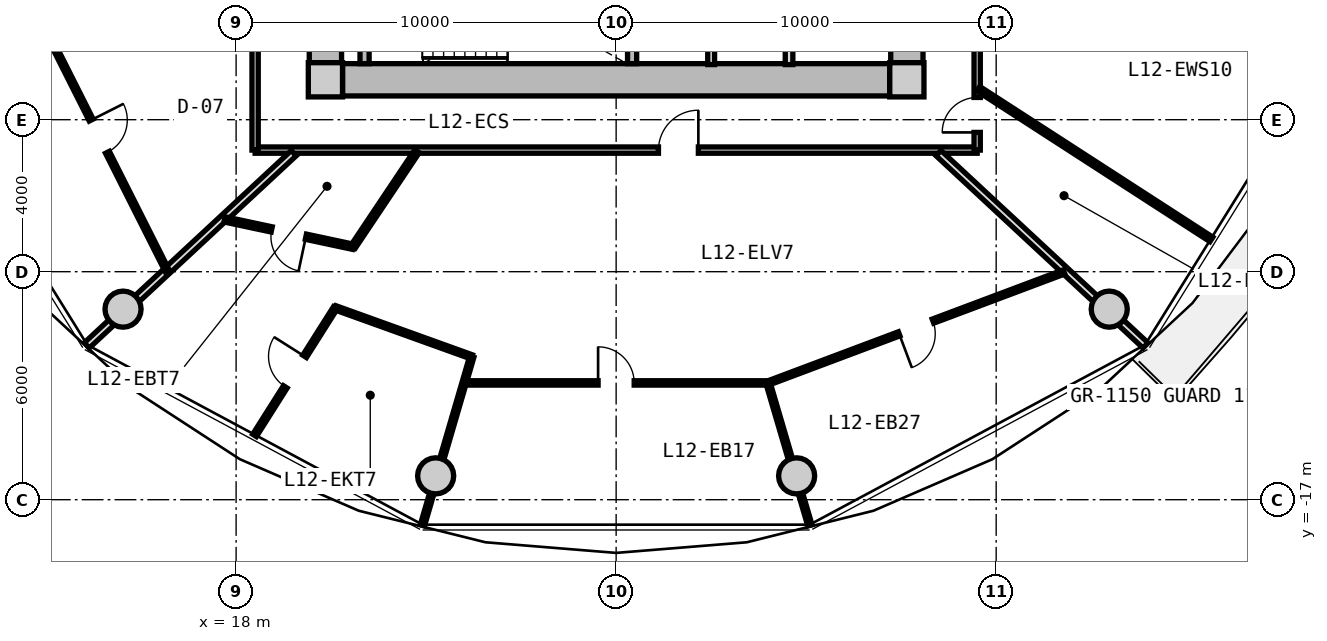
"""IFC4 building model, lengths in metres.
Left out: names, types, materials, properties, quantities, classifications, styles, units other than length and angle.
Written with IfcOpenShell. Run it as: python <this file> out.ifc"""

import sys

from ifc_helpers import new_model, si_unit, direction, frame, frame_2d, origin, origin_2d, place, context, subcontext, project, spatial, rectangle, circle, extrude, source, transform, mapped, element, fill, save


model = new_model("IFC4")
c1 = context("Model", 3, precision=1e-05, world=origin(), true_north=direction((0.0, 1.0)))
c2 = subcontext(c1, "Body", "Model", "MODEL_VIEW")
j1 = project(units=[si_unit("LENGTHUNIT", "METRE"), si_unit("PLANEANGLEUNIT", "RADIAN")], contexts=[c1])
p1 = place(None, origin())
s1 = spatial("IfcSite", under=j1, at=p1, CompositionType="ELEMENT")
p2 = place(p1, origin())
s2 = spatial("IfcBuilding", under=s1, at=p2, CompositionType="ELEMENT")
p3 = place(p2, frame((0.0, 0.0, 42.95)))
s3 = spatial("IfcBuildingStorey", under=s2, at=p3, CompositionType="ELEMENT", Elevation=42.95)
m1 = source(origin(), c2, "Body", "SweptSolid", [
    extrude(rectangle(XDim=0.9, YDim=0.9, at=origin_2d()), origin(), (0.0, 0.0, 1.0), 3.05),
])
for number, where, z_axis, x_axis in (
    (1, (20.35, -5.95, 0.0), (0.0, 0.0, 1.0), (1.0, 0.0, 0.0)),
    (2, (35.65, -5.95, 0.0), (0.0, 0.0, 1.0), (1.0, 0.0, 0.0)),
):
    element("IfcColumn", number, at=place(p3, frame(where, z_axis=z_axis, x_axis=x_axis)), inside=s3, PredefinedType="COLUMN", context=c2, shape_type="MappedRepresentation", body=[
        mapped(m1, transform((0.0, 0.0, 0.0), x_axis=(1.0, 0.0, 0.0), y_axis=(0.0, 1.0, 0.0), z_axis=(0.0, 0.0, 1.0), scale=1.0)),
    ])
m2 = source(origin(), c2, "Body", "SweptSolid", [
    extrude(rectangle(XDim=14.4, YDim=0.85, at=frame_2d((7.2, 0.0))), origin(), (0.0, 0.0, 1.0), 2.79),
])
p4 = place(p3, frame((35.2, -5.95, 0.0), z_axis=(0.0, 0.0, 1.0), x_axis=(-1.0, 0.0, 0.0)))
e3 = element("IfcWall", 3, at=p4, inside=s3, PredefinedType="SHEAR", context=c2, shape_type="MappedRepresentation", body=[
    mapped(m2, transform((0.0, 0.0, 0.0), x_axis=(1.0, 0.0, 0.0), y_axis=(0.0, 1.0, 0.0), z_axis=(0.0, 0.0, 1.0), scale=1.0)),
])
m3 = source(origin(), c2, "Body", "SweptSolid", [
    extrude(rectangle(XDim=11.0, YDim=0.85, at=frame_2d((5.5, 0.0))), origin(), (0.0, 0.0, 1.0), 2.79),
])
p5 = place(p3, frame((20.35, -5.5, 0.0), z_axis=(0.0, 0.0, 1.0), x_axis=(0.0, 1.0, 0.0)))
e4 = element("IfcWall", 4, at=p5, inside=s3, PredefinedType="SHEAR", context=c2, shape_type="MappedRepresentation", body=[
    mapped(m3, transform((0.0, 0.0, 0.0), x_axis=(1.0, 0.0, 0.0), y_axis=(0.0, 1.0, 0.0), z_axis=(0.0, 0.0, 1.0), scale=1.0)),
])
p6 = place(p5, frame((3.8, 0.0, 0.0)))
e5 = element("IfcOpeningElement", 5, at=p6, cuts=e4, PredefinedType="OPENING", context=c2, shape_type="SweptSolid", body=[
    extrude(rectangle(XDim=1.2, YDim=2.15, at=frame_2d((0.6, 1.075))), frame((0.0, 0.435, 0.0), z_axis=(0.0, -1.0, 0.0), x_axis=(1.0, 0.0, 0.0)), (0.0, 0.0, 1.0), 0.87),
])
p7 = place(p3, frame((35.65, 5.5, 0.0), z_axis=(0.0, 0.0, 1.0), x_axis=(0.0, -1.0, 0.0)))
e6 = element("IfcWall", 6, at=p7, inside=s3, PredefinedType="SHEAR", context=c2, shape_type="MappedRepresentation", body=[
    mapped(m3, transform((0.0, 0.0, 0.0), x_axis=(1.0, 0.0, 0.0), y_axis=(0.0, 1.0, 0.0), z_axis=(0.0, 0.0, 1.0), scale=1.0)),
])
p8 = place(p7, frame((5.65, 0.0, 0.0)))
e7 = element("IfcOpeningElement", 7, at=p8, cuts=e6, PredefinedType="OPENING", context=c2, shape_type="SweptSolid", body=[
    extrude(rectangle(XDim=1.2, YDim=2.15, at=frame_2d((0.6, 1.075))), frame((0.0, 0.435, 0.0), z_axis=(0.0, -1.0, 0.0), x_axis=(1.0, 0.0, 0.0)), (0.0, 0.0, 1.0), 0.87),
])
m4 = source(origin(), c2, "Body", "SweptSolid", [
    extrude(circle(Radius=0.475, at=origin_2d()), origin(), (0.0, 0.0, 1.0), 3.05),
])
for number, where, z_axis, x_axis in (
    (8, (15.025, -11.985, 0.0), (0.0, 0.0, 1.0), (1.0, 0.0, 0.0)),
    (9, (23.251, -16.373, 0.0), (0.0, 0.0, 1.0), (1.0, 0.0, 0.0)),
    (10, (32.749, -16.373, 0.0), (0.0, 0.0, 1.0), (1.0, 0.0, 0.0)),
    (11, (40.975, -11.985, 0.0), (0.0, 0.0, 1.0), (1.0, 0.0, 0.0)),
):
    element("IfcColumn", number, at=place(p3, frame(where, z_axis=z_axis, x_axis=x_axis)), inside=s3, PredefinedType="COLUMN", context=c2, shape_type="MappedRepresentation", body=[
        mapped(m4, transform((0.0, 0.0, 0.0), x_axis=(1.0, 0.0, 0.0), y_axis=(0.0, 1.0, 0.0), z_axis=(0.0, 0.0, 1.0), scale=1.0)),
    ])
m5 = source(origin(), c2, "Body", "SweptSolid", [
    extrude(rectangle(XDim=3.075, YDim=0.24, at=frame_2d((1.538, 0.0))), origin(), (0.0, 0.0, 1.0), 2.79),
])
for number, where, z_axis, x_axis in (
    (12, (21.38, -5.525, 0.0), (0.0, 0.0, 1.0), (0.0, 1.0, 0.0)),
    (13, (28.42, -5.525, 0.0), (0.0, 0.0, 1.0), (0.0, 1.0, 0.0)),
):
    element("IfcWall", number, at=place(p3, frame(where, z_axis=z_axis, x_axis=x_axis)), inside=s3, PredefinedType="PARTITIONING", context=c2, shape_type="MappedRepresentation", body=[
        mapped(m5, transform((0.0, 0.0, 0.0), x_axis=(1.0, 0.0, 0.0), y_axis=(0.0, 1.0, 0.0), z_axis=(0.0, 0.0, 1.0), scale=1.0)),
    ])
m6 = source(origin(), c2, "Body", "SweptSolid", [
    extrude(rectangle(XDim=3.8, YDim=0.2, at=frame_2d((1.9, 0.0))), origin(), (0.0, 0.0, 1.0), 2.775),
])
p9 = place(p3, frame((32.55, -5.55, 0.0), z_axis=(0.0, 0.0, 1.0), x_axis=(0.0, 1.0, 0.0)))
e14 = element("IfcWall", 14, at=p9, inside=s3, PredefinedType="PARTITIONING", context=c2, shape_type="MappedRepresentation", body=[
    mapped(m6, transform((0.0, 0.0, 0.0), x_axis=(1.0, 0.0, 0.0), y_axis=(0.0, 1.0, 0.0), z_axis=(0.0, 0.0, 1.0), scale=1.0)),
])
m7 = source(origin(), c2, "Body", "SweptSolid", [
    extrude(rectangle(XDim=3.22, YDim=0.18, at=frame_2d((1.61, 0.0))), origin(), (0.0, 0.0, 1.0), 2.775),
])
p10 = place(p3, frame((30.5, -5.55, 0.0), z_axis=(0.0, 0.0, 1.0), x_axis=(0.0, 1.0, 0.0)))
e15 = element("IfcWall", 15, at=p10, inside=s3, PredefinedType="PARTITIONING", context=c2, shape_type="MappedRepresentation", body=[
    mapped(m7, transform((0.0, 0.0, 0.0), x_axis=(1.0, 0.0, 0.0), y_axis=(0.0, 1.0, 0.0), z_axis=(0.0, 0.0, 1.0), scale=1.0)),
])
m8 = source(origin(), c2, "Body", "SweptSolid", [
    extrude(rectangle(XDim=19.0, YDim=0.165, at=frame_2d((9.5, 0.0))), origin(), (0.0, 0.0, 1.0), 2.775),
])
p11 = place(p3, frame((37.5, -7.8, 0.0), z_axis=(0.0, 0.0, 1.0), x_axis=(-1.0, 0.0, 0.0)))
e16 = element("IfcWall", 16, at=p11, inside=s3, PredefinedType="PARTITIONING", context=c2, shape_type="MappedRepresentation", body=[
    mapped(m8, transform((0.0, 0.0, 0.0), x_axis=(1.0, 0.0, 0.0), y_axis=(0.0, 1.0, 0.0), z_axis=(0.0, 0.0, 1.0), scale=1.0)),
])
p12 = place(p11, frame((7.336, 0.0, 0.0)))
e17 = element("IfcOpeningElement", 17, at=p12, cuts=e16, PredefinedType="OPENING", context=c2, shape_type="SweptSolid", body=[
    extrude(rectangle(XDim=1.05, YDim=2.15, at=frame_2d((0.525, 1.075))), frame((0.0, 0.093, 0.0), z_axis=(0.0, -1.0, 0.0), x_axis=(1.0, 0.0, 0.0)), (0.0, 0.0, 1.0), 0.185),
])
m9 = source(origin(), c2, "Body", "SweptSolid", [
    extrude(rectangle(XDim=15.6, YDim=0.165, at=frame_2d((7.8, 0.0))), origin(), (0.0, 0.0, 1.0), 2.775),
])
p13 = place(p3, frame((18.5, -7.8, 0.0), z_axis=(0.0, 0.0, 1.0), x_axis=(0.0, 1.0, 0.0)))
e18 = element("IfcWall", 18, at=p13, inside=s3, PredefinedType="PARTITIONING", context=c2, shape_type="MappedRepresentation", body=[
    mapped(m9, transform((0.0, 0.0, 0.0), x_axis=(1.0, 0.0, 0.0), y_axis=(0.0, 1.0, 0.0), z_axis=(0.0, 0.0, 1.0), scale=1.0)),
])
p14 = place(p13, frame((7.275, 0.0, 0.0)))
e19 = element("IfcOpeningElement", 19, at=p14, cuts=e18, PredefinedType="OPENING", context=c2, shape_type="SweptSolid", body=[
    extrude(rectangle(XDim=1.05, YDim=2.15, at=frame_2d((0.525, 1.075))), frame((0.0, 0.093, 0.0), z_axis=(0.0, -1.0, 0.0), x_axis=(1.0, 0.0, 0.0)), (0.0, 0.0, 1.0), 0.185),
])
p15 = place(p3, frame((37.5, 7.8, 0.0), z_axis=(0.0, 0.0, 1.0), x_axis=(0.0, -1.0, 0.0)))
e20 = element("IfcWall", 20, at=p15, inside=s3, PredefinedType="PARTITIONING", context=c2, shape_type="MappedRepresentation", body=[
    mapped(m9, transform((0.0, 0.0, 0.0), x_axis=(1.0, 0.0, 0.0), y_axis=(0.0, 1.0, 0.0), z_axis=(0.0, 0.0, 1.0), scale=1.0)),
])
p16 = place(p15, frame((14.215, 0.0, 0.0)))
e21 = element("IfcOpeningElement", 21, at=p16, cuts=e20, PredefinedType="OPENING", context=c2, shape_type="SweptSolid", body=[
    extrude(rectangle(XDim=0.92, YDim=2.1, at=frame_2d((0.46, 1.05))), frame((0.0, 0.093, 0.0), z_axis=(0.0, -1.0, 0.0), x_axis=(1.0, 0.0, 0.0)), (0.0, 0.0, 1.0), 0.185),
])
p17 = place(p15, frame((11.609, 0.0, 0.0)))
e22 = element("IfcOpeningElement", 22, at=p17, cuts=e20, PredefinedType="OPENING", context=c2, shape_type="SweptSolid", body=[
    extrude(rectangle(XDim=0.92, YDim=2.1, at=frame_2d((0.46, 1.05))), frame((0.0, 0.093, 0.0), z_axis=(0.0, -1.0, 0.0), x_axis=(1.0, 0.0, 0.0)), (0.0, 0.0, 1.0), 0.185),
])
p18 = place(p15, frame((7.175, 0.0, 0.0)))
e23 = element("IfcOpeningElement", 23, at=p18, cuts=e20, PredefinedType="OPENING", context=c2, shape_type="SweptSolid", body=[
    extrude(rectangle(XDim=1.25, YDim=2.2, at=frame_2d((0.625, 1.1))), frame((0.0, 0.093, 0.0), z_axis=(0.0, -1.0, 0.0), x_axis=(1.0, 0.0, 0.0)), (0.0, 0.0, 1.0), 0.185),
])
m10 = source(origin(), c2, "Body", "SweptSolid", [
    extrude(rectangle(XDim=7.435, YDim=0.19, at=frame_2d((3.717, 0.0))), origin(), (0.0, 0.0, 1.0), 2.225),
])
p19 = place(p3, frame((19.517, -7.88, 0.0), z_axis=(0.0, 0.0, 1.0), x_axis=(-0.732651956848, -0.680603489652, 0.0)))
e24 = element("IfcWall", 24, at=p19, inside=s3, PredefinedType="PARTITIONING", context=c2, shape_type="MappedRepresentation", body=[
    mapped(m10, transform((0.0, 0.0, 0.0), x_axis=(1.0, 0.0, 0.0), y_axis=(0.0, 1.0, 0.0), z_axis=(0.0, 0.0, 1.0), scale=1.0)),
])
m11 = source(origin(), c2, "Body", "SweptSolid", [
    extrude(rectangle(XDim=8.018, YDim=0.115, at=frame_2d((4.009, 0.0))), origin(), (0.0, 0.0, 1.0), 2.775),
])
p20 = place(p3, frame((12.596, -3.854, 0.0), z_axis=(0.0, 0.0, 1.0), x_axis=(0.450134355233, -0.89296084026, 0.0)))
e25 = element("IfcWall", 25, at=p20, inside=s3, PredefinedType="PARTITIONING", context=c2, shape_type="MappedRepresentation", body=[
    mapped(m11, transform((0.0, 0.0, 0.0), x_axis=(1.0, 0.0, 0.0), y_axis=(0.0, 1.0, 0.0), z_axis=(0.0, 0.0, 1.0), scale=1.0)),
])
p21 = place(p20, frame((3.534, 0.0, 0.0)))
e26 = element("IfcOpeningElement", 26, at=p21, cuts=e25, PredefinedType="OPENING", context=c2, shape_type="SweptSolid", body=[
    extrude(rectangle(XDim=0.95, YDim=2.1, at=frame_2d((0.475, 1.05))), frame((0.0, 0.067, 0.0), z_axis=(0.0, -1.0, 0.0), x_axis=(1.0, 0.0, 0.0)), (0.0, 0.0, 1.0), 0.135),
])
p22 = place(p3, frame((36.483, -7.88, 0.0), z_axis=(0.0, 0.0, 1.0), x_axis=(0.732651956848, -0.680603489652, 0.0)))
e27 = element("IfcWall", 27, at=p22, inside=s3, PredefinedType="PARTITIONING", context=c2, shape_type="MappedRepresentation", body=[
    mapped(m10, transform((0.0, 0.0, 0.0), x_axis=(1.0, 0.0, 0.0), y_axis=(0.0, 1.0, 0.0), z_axis=(0.0, 0.0, 1.0), scale=1.0)),
])
m12 = source(origin(), c2, "Body", "SweptSolid", [
    extrude(rectangle(XDim=7.993, YDim=0.115, at=frame_2d((3.996, 0.0))), origin(), (0.0, 0.0, 1.0), 2.775),
])
p23 = place(p3, frame((24.004, -13.927, 0.0), z_axis=(0.0, 0.0, 1.0), x_axis=(1.0, 0.0, 0.0)))
e28 = element("IfcWall", 28, at=p23, inside=s3, PredefinedType="PARTITIONING", context=c2, shape_type="MappedRepresentation", body=[
    mapped(m12, transform((0.0, 0.0, 0.0), x_axis=(1.0, 0.0, 0.0), y_axis=(0.0, 1.0, 0.0), z_axis=(0.0, 0.0, 1.0), scale=1.0)),
])
p24 = place(p23, frame((3.521, 0.0, 0.0)))
e29 = element("IfcOpeningElement", 29, at=p24, cuts=e28, PredefinedType="OPENING", context=c2, shape_type="SweptSolid", body=[
    extrude(rectangle(XDim=0.95, YDim=2.1, at=frame_2d((0.475, 1.05))), frame((0.0, 0.067, 0.0), z_axis=(0.0, -1.0, 0.0), x_axis=(1.0, 0.0, 0.0)), (0.0, 0.0, 1.0), 0.135),
])
m13 = source(origin(), c2, "Body", "SweptSolid", [
    extrude(rectangle(XDim=4.625, YDim=0.115, at=frame_2d((2.312, 0.0))), origin(), (0.0, 0.0, 1.0), 2.225),
])
p25 = place(p3, frame((24.201, -13.239, 0.0), z_axis=(0.0, 0.0, 1.0), x_axis=(-0.2810742844, -0.959686014616, 0.0)))
e30 = element("IfcWall", 30, at=p25, inside=s3, PredefinedType="PARTITIONING", context=c2, shape_type="MappedRepresentation", body=[
    mapped(m13, transform((0.0, 0.0, 0.0), x_axis=(1.0, 0.0, 0.0), y_axis=(0.0, 1.0, 0.0), z_axis=(0.0, 0.0, 1.0), scale=1.0)),
])
m14 = source(origin(), c2, "Body", "SweptSolid", [
    extrude(rectangle(XDim=8.32, YDim=0.115, at=frame_2d((4.16, 0.0))), origin(), (0.0, 0.0, 1.0), 2.775),
])
p26 = place(p3, frame((31.997, -13.93, 0.0), z_axis=(0.0, 0.0, 1.0), x_axis=(0.936180763098, 0.351518959382, 0.0)))
e31 = element("IfcWall", 31, at=p26, inside=s3, PredefinedType="PARTITIONING", context=c2, shape_type="MappedRepresentation", body=[
    mapped(m14, transform((0.0, 0.0, 0.0), x_axis=(1.0, 0.0, 0.0), y_axis=(0.0, 1.0, 0.0), z_axis=(0.0, 0.0, 1.0), scale=1.0)),
])
p27 = place(p26, frame((3.685, 0.0, 0.0)))
e32 = element("IfcOpeningElement", 32, at=p27, cuts=e31, PredefinedType="OPENING", context=c2, shape_type="SweptSolid", body=[
    extrude(rectangle(XDim=0.95, YDim=2.1, at=frame_2d((0.475, 1.05))), frame((0.0, 0.067, 0.0), z_axis=(0.0, -1.0, 0.0), x_axis=(1.0, 0.0, 0.0)), (0.0, 0.0, 1.0), 0.135),
])
m15 = source(origin(), c2, "Body", "SweptSolid", [
    extrude(rectangle(XDim=3.905, YDim=0.115, at=frame_2d((1.952, 0.0))), origin(), (0.0, 0.0, 1.0), 2.225),
])
p28 = place(p3, frame((31.997, -13.93, 0.0), z_axis=(0.0, 0.0, 1.0), x_axis=(0.282037692958, -0.959403324859, 0.0)))
e33 = element("IfcWall", 33, at=p28, inside=s3, PredefinedType="PARTITIONING", context=c2, shape_type="MappedRepresentation", body=[
    mapped(m15, transform((0.0, 0.0, 0.0), x_axis=(1.0, 0.0, 0.0), y_axis=(0.0, 1.0, 0.0), z_axis=(0.0, 0.0, 1.0), scale=1.0)),
])
m16 = source(origin(), c2, "Body", "SweptSolid", [
    extrude(rectangle(XDim=3.025, YDim=0.14, at=frame_2d((1.513, 0.0))), origin(), (0.0, 0.0, 1.0), 2.775),
])
p29 = place(p3, frame((22.76, -7.83, 0.0), z_axis=(0.0, 0.0, 1.0), x_axis=(-0.556189165904, -0.831055721195, 0.0)))
e34 = element("IfcWall", 34, at=p29, inside=s3, PredefinedType="PARTITIONING", context=c2, shape_type="MappedRepresentation", body=[
    mapped(m16, transform((0.0, 0.0, 0.0), x_axis=(1.0, 0.0, 0.0), y_axis=(0.0, 1.0, 0.0), z_axis=(0.0, 0.0, 1.0), scale=1.0)),
])
m17 = source(origin(), c2, "Body", "SweptSolid", [
    extrude(rectangle(XDim=3.459, YDim=0.14, at=frame_2d((1.729, 0.0))), origin(), (0.0, 0.0, 1.0), 2.775),
])
p30 = place(p3, frame((21.078, -10.344, 0.0), z_axis=(0.0, 0.0, 1.0), x_axis=(-0.978006468578, 0.208574560815, 0.0)))
e35 = element("IfcWall", 35, at=p30, inside=s3, PredefinedType="PARTITIONING", context=c2, shape_type="MappedRepresentation", body=[
    mapped(m17, transform((0.0, 0.0, 0.0), x_axis=(1.0, 0.0, 0.0), y_axis=(0.0, 1.0, 0.0), z_axis=(0.0, 0.0, 1.0), scale=1.0)),
])
p31 = place(p30, frame((1.27, 0.0, 0.0)))
e36 = element("IfcOpeningElement", 36, at=p31, cuts=e35, PredefinedType="OPENING", context=c2, shape_type="SweptSolid", body=[
    extrude(rectangle(XDim=0.92, YDim=2.1, at=frame_2d((0.46, 1.05))), frame((0.0, 0.08, 0.0), z_axis=(0.0, -1.0, 0.0), x_axis=(1.0, 0.0, 0.0)), (0.0, 0.0, 1.0), 0.16),
])
m18 = source(origin(), c2, "Body", "SweptSolid", [
    extrude(rectangle(XDim=3.974, YDim=0.115, at=frame_2d((1.987, 0.0))), origin(), (0.0, 0.0, 1.0), 2.775),
])
p32 = place(p3, frame((20.611, -11.95, 0.0), z_axis=(0.0, 0.0, 1.0), x_axis=(-0.534810918023, -0.844971764003, 0.0)))
e37 = element("IfcWall", 37, at=p32, inside=s3, PredefinedType="PARTITIONING", context=c2, shape_type="MappedRepresentation", body=[
    mapped(m18, transform((0.0, 0.0, 0.0), x_axis=(1.0, 0.0, 0.0), y_axis=(0.0, 1.0, 0.0), z_axis=(0.0, 0.0, 1.0), scale=1.0)),
])
p33 = place(p32, frame((1.512, 0.0, 0.0)))
e38 = element("IfcOpeningElement", 38, at=p33, cuts=e37, PredefinedType="OPENING", context=c2, shape_type="SweptSolid", body=[
    extrude(rectangle(XDim=0.95, YDim=2.1, at=frame_2d((0.475, 1.05))), frame((0.0, 0.067, 0.0), z_axis=(0.0, -1.0, 0.0), x_axis=(1.0, 0.0, 0.0)), (0.0, 0.0, 1.0), 0.135),
])
m19 = source(origin(), c2, "Body", "SweptSolid", [
    extrude(rectangle(XDim=3.814, YDim=0.115, at=frame_2d((1.907, 0.0))), origin(), (0.0, 0.0, 1.0), 2.775),
])
p34 = place(p3, frame((20.611, -11.95, 0.0), z_axis=(0.0, 0.0, 1.0), x_axis=(0.940935542004, -0.338585743637, 0.0)))
e39 = element("IfcWall", 39, at=p34, inside=s3, PredefinedType="PARTITIONING", context=c2, shape_type="MappedRepresentation", body=[
    mapped(m19, transform((0.0, 0.0, 0.0), x_axis=(1.0, 0.0, 0.0), y_axis=(0.0, 1.0, 0.0), z_axis=(0.0, 0.0, 1.0), scale=1.0)),
])
m20 = source(origin(), c2, "Body", "SweptSolid", [
    extrude(rectangle(XDim=7.304, YDim=0.14, at=frame_2d((3.652, 0.0))), origin(), (0.0, 0.0, 1.0), 2.775),
])
p35 = place(p3, frame((37.53, -6.185, 0.0), z_axis=(0.0, 0.0, 1.0), x_axis=(0.83973870965, -0.54299069929, 0.0)))
e40 = element("IfcWall", 40, at=p35, inside=s3, PredefinedType="PARTITIONING", context=c2, shape_type="MappedRepresentation", body=[
    mapped(m20, transform((0.0, 0.0, 0.0), x_axis=(1.0, 0.0, 0.0), y_axis=(0.0, 1.0, 0.0), z_axis=(0.0, 0.0, 1.0), scale=1.0)),
])
m21 = source(origin(), c2, "Body", "SweptSolid", [
    extrude(rectangle(XDim=0.95, YDim=2.1, at=frame_2d((0.475, 1.05))), frame((0.0, 0.025, 0.0), z_axis=(0.0, -1.0, 0.0), x_axis=(1.0, 0.0, 0.0)), (0.0, 0.0, 1.0), 0.05),
])
p36 = place(p21, origin())
e41 = element("IfcDoor", 41, at=p36, inside=s3, OperationType="SINGLE_SWING_LEFT", PredefinedType="DOOR", context=c2, shape_type="MappedRepresentation", body=[
    mapped(m21, transform((0.0, 0.0, 0.0), x_axis=(1.0, 0.0, 0.0), y_axis=(0.0, 1.0, 0.0), z_axis=(0.0, 0.0, 1.0), scale=1.0)),
])
fill(e26, e41)
m22 = source(origin(), c2, "Body", "SweptSolid", [
    extrude(rectangle(XDim=1.05, YDim=2.15, at=frame_2d((0.525, 1.075))), frame((0.0, 0.025, 0.0), z_axis=(0.0, -1.0, 0.0), x_axis=(1.0, 0.0, 0.0)), (0.0, 0.0, 1.0), 0.05),
])
p37 = place(p12, frame((1.05, 0.0, 0.0), z_axis=(0.0, 0.0, 1.0), x_axis=(-1.0, 0.0, 0.0)))
e42 = element("IfcDoor", 42, at=p37, inside=s3, OperationType="SINGLE_SWING_RIGHT", PredefinedType="DOOR", context=c2, shape_type="MappedRepresentation", body=[
    mapped(m22, transform((0.0, 0.0, 0.0), x_axis=(1.0, 0.0, 0.0), y_axis=(0.0, 1.0, 0.0), z_axis=(0.0, 0.0, 1.0), scale=1.0)),
])
fill(e17, e42)
m23 = source(origin(), c2, "Body", "SweptSolid", [
    extrude(rectangle(XDim=0.92, YDim=2.1, at=frame_2d((0.46, 1.05))), frame((0.0, 0.025, 0.0), z_axis=(0.0, -1.0, 0.0), x_axis=(1.0, 0.0, 0.0)), (0.0, 0.0, 1.0), 0.05),
])
p38 = place(p31, origin())
e43 = element("IfcDoor", 43, at=p38, inside=s3, OperationType="SINGLE_SWING_LEFT", PredefinedType="DOOR", context=c2, shape_type="MappedRepresentation", body=[
    mapped(m23, transform((0.0, 0.0, 0.0), x_axis=(1.0, 0.0, 0.0), y_axis=(0.0, 1.0, 0.0), z_axis=(0.0, 0.0, 1.0), scale=1.0)),
])
fill(e36, e43)
p39 = place(p33, frame((0.95, 0.0, 0.0), z_axis=(0.0, 0.0, 1.0), x_axis=(-1.0, 0.0, 0.0)))
e44 = element("IfcDoor", 44, at=p39, inside=s3, OperationType="SINGLE_SWING_RIGHT", PredefinedType="DOOR", context=c2, shape_type="MappedRepresentation", body=[
    mapped(m21, transform((0.0, 0.0, 0.0), x_axis=(1.0, 0.0, 0.0), y_axis=(0.0, 1.0, 0.0), z_axis=(0.0, 0.0, 1.0), scale=1.0)),
])
fill(e38, e44)
p40 = place(p24, origin())
e45 = element("IfcDoor", 45, at=p40, inside=s3, OperationType="SINGLE_SWING_LEFT", PredefinedType="DOOR", context=c2, shape_type="MappedRepresentation", body=[
    mapped(m21, transform((0.0, 0.0, 0.0), x_axis=(1.0, 0.0, 0.0), y_axis=(0.0, 1.0, 0.0), z_axis=(0.0, 0.0, 1.0), scale=1.0)),
])
fill(e29, e45)
p41 = place(p27, frame((0.95, 0.0, 0.0), z_axis=(0.0, 0.0, 1.0), x_axis=(-1.0, 0.0, 0.0)))
e46 = element("IfcDoor", 46, at=p41, inside=s3, OperationType="SINGLE_SWING_RIGHT", PredefinedType="DOOR", context=c2, shape_type="MappedRepresentation", body=[
    mapped(m21, transform((0.0, 0.0, 0.0), x_axis=(1.0, 0.0, 0.0), y_axis=(0.0, 1.0, 0.0), z_axis=(0.0, 0.0, 1.0), scale=1.0)),
])
fill(e32, e46)
p42 = place(p16, frame((0.92, 0.0, 0.0), z_axis=(0.0, 0.0, 1.0), x_axis=(-1.0, 0.0, 0.0)))
e47 = element("IfcDoor", 47, at=p42, inside=s3, OperationType="SINGLE_SWING_LEFT", PredefinedType="DOOR", context=c2, shape_type="MappedRepresentation", body=[
    mapped(m23, transform((0.0, 0.0, 0.0), x_axis=(1.0, 0.0, 0.0), y_axis=(0.0, 1.0, 0.0), z_axis=(0.0, 0.0, 1.0), scale=1.0)),
])
fill(e21, e47)
save(model, sys.argv[1])
